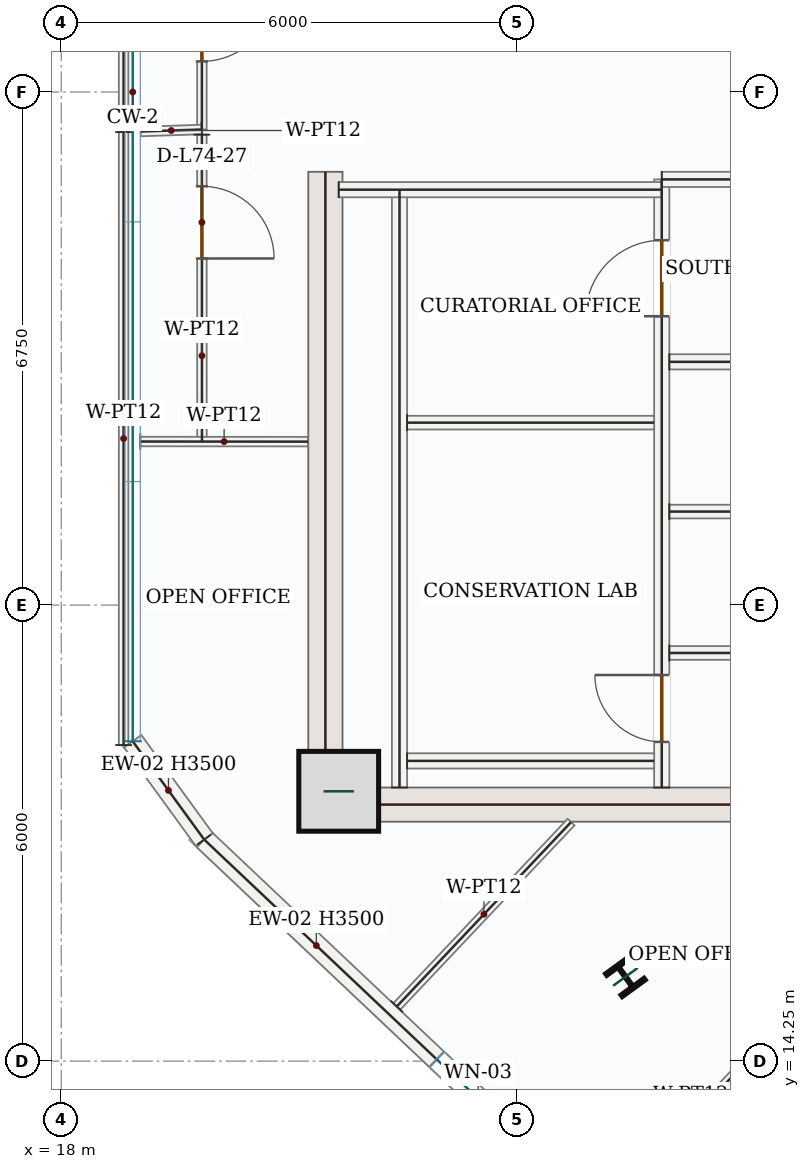
"""IFC4 building model, lengths in metres.
Left out: names, types, materials, properties, quantities, classifications, styles, units other than length and angle.
Written with IfcOpenShell. Run it as: python <this file> out.ifc"""

import sys

from ifc_helpers import new_model, si_unit, direction, frame, frame_2d, origin, origin_2d, place, context, subcontext, project, spatial, rectangle, i_section, extrude, source, transform, mapped, element, fill, save


model = new_model("IFC4")
c1 = context("Model", 3, precision=1e-05, world=origin(), true_north=direction((0.0, 1.0)))
c2 = subcontext(c1, "Body", "Model", "MODEL_VIEW")
j1 = project(units=[si_unit("LENGTHUNIT", "METRE"), si_unit("PLANEANGLEUNIT", "RADIAN")], contexts=[c1])
p1 = place(None, origin())
s1 = spatial("IfcSite", under=j1, at=p1, CompositionType="ELEMENT")
p2 = place(p1, origin())
s2 = spatial("IfcBuilding", under=s1, at=p2, CompositionType="ELEMENT")
p3 = place(p2, frame((0.0, 0.0, 306.6)))
s3 = spatial("IfcBuildingStorey", under=s2, at=p3, CompositionType="ELEMENT", Elevation=306.6)
m1 = source(origin(), c2, "Body", "SweptSolid", [
    extrude(rectangle(XDim=8.55, YDim=0.45, at=frame_2d((4.275, 0.0))), origin(), (0.0, 0.0, 1.0), 3.5),
])
p4 = place(p3, frame((21.475, 17.4, 0.0), z_axis=(0.0, 0.0, 1.0), x_axis=(0.0, 1.0, 0.0)))
e1 = element("IfcWall", 1, at=p4, inside=s3, PredefinedType="SHEAR", context=c2, shape_type="MappedRepresentation", body=[
    mapped(m1, transform((0.0, 0.0, 0.0), x_axis=(1.0, 0.0, 0.0), y_axis=(0.0, 1.0, 0.0), z_axis=(0.0, 0.0, 1.0), scale=1.0)),
])
m2 = source(origin(), c2, "Body", "SweptSolid", [
    extrude(rectangle(XDim=7.1, YDim=0.45, at=frame_2d((3.55, 0.0))), origin(), (0.0, 0.0, 1.0), 3.5),
])
p5 = place(p3, frame((21.7, 17.625, 0.0), z_axis=(0.0, 0.0, 1.0), x_axis=(1.0, 0.0, 0.0)))
e2 = element("IfcWall", 2, at=p5, inside=s3, PredefinedType="SHEAR", context=c2, shape_type="MappedRepresentation", body=[
    mapped(m2, transform((0.0, 0.0, 0.0), x_axis=(1.0, 0.0, 0.0), y_axis=(0.0, 1.0, 0.0), z_axis=(0.0, 0.0, 1.0), scale=1.0)),
])
m3 = source(origin(), c2, "Body", "SweptSolid", [
    extrude(rectangle(XDim=1.05, YDim=1.05, at=origin_2d()), origin(), (0.0, 0.0, 1.0), 3.75),
])
p6 = place(p3, frame((21.65, 17.8, 0.0), z_axis=(0.0, 0.0, 1.0), x_axis=(1.0, 0.0, 0.0)))
e3 = element("IfcColumn", 3, at=p6, inside=s3, PredefinedType="COLUMN", context=c2, shape_type="MappedRepresentation", body=[
    mapped(m3, transform((0.0, 0.0, 0.0), x_axis=(1.0, 0.0, 0.0), y_axis=(0.0, 1.0, 0.0), z_axis=(0.0, 0.0, 1.0), scale=1.0)),
])
m4 = source(origin(), c2, "Body", "SweptSolid", [
    extrude(i_section(OverallWidth=0.374, OverallDepth=0.372, WebThickness=0.016, FlangeThickness=0.026, FilletRadius=0.018, at=origin_2d()), origin(), (0.0, 0.0, 1.0), 3.75),
])
p7 = place(p3, frame((25.422, 15.359, 0.0), z_axis=(0.0, 0.0, 1.0), x_axis=(0.809016994375, 0.587785252292, 0.0)))
e4 = element("IfcColumn", 4, at=p7, inside=s3, PredefinedType="COLUMN", context=c2, shape_type="MappedRepresentation", body=[
    mapped(m4, transform((0.0, 0.0, 0.0), x_axis=(1.0, 0.0, 0.0), y_axis=(0.0, 1.0, 0.0), z_axis=(0.0, 0.0, 1.0), scale=1.0)),
])
p8 = place(p3, frame((27.09, 10.351, 0.0), z_axis=(0.0, 0.0, 1.0), x_axis=(-0.726772856404, 0.686877875022, 0.0)))
e5 = element("IfcWall", 5, at=p8, inside=s3, PredefinedType="SOLIDWALL", context=c2, shape_type="SweptSolid", body=[
    extrude(rectangle(XDim=9.92, YDim=0.28, at=frame_2d((4.96, 0.0))), origin(), (0.0, 0.0, 1.0), 3.5),
])
p9 = place(p8, frame((4.21, 0.0, 0.85)))
e6 = element("IfcOpeningElement", 6, at=p9, cuts=e5, PredefinedType="OPENING", context=c2, shape_type="SweptSolid", body=[
    extrude(rectangle(XDim=1.5, YDim=1.5, at=frame_2d((0.75, 0.75))), frame((0.0, 0.15, 0.0), z_axis=(0.0, -1.0, 0.0), x_axis=(1.0, 0.0, 0.0)), (0.0, 0.0, 1.0), 0.3),
])
m5 = source(origin(), c2, "Body", "SweptSolid", [
    extrude(rectangle(XDim=1.599, YDim=0.28, at=frame_2d((0.799, 0.0))), origin(), (0.0, 0.0, 1.0), 3.5),
])
p10 = place(p3, frame((19.88, 17.165, 0.0), z_axis=(0.0, 0.0, 1.0), x_axis=(-0.58820801539, 0.808709670173, 0.0)))
e7 = element("IfcWall", 7, at=p10, inside=s3, PredefinedType="SOLIDWALL", context=c2, shape_type="MappedRepresentation", body=[
    mapped(m5, transform((0.0, 0.0, 0.0), x_axis=(1.0, 0.0, 0.0), y_axis=(0.0, 1.0, 0.0), z_axis=(0.0, 0.0, 1.0), scale=1.0)),
])
m6 = source(origin(), c2, "Body", "SweptSolid", [
    extrude(rectangle(XDim=7.87, YDim=0.2, at=frame_2d((3.935, 0.0))), origin(), (0.0, 0.0, 1.0), 3.5),
])
p11 = place(p3, frame((22.45, 17.85, 0.0), z_axis=(0.0, 0.0, 1.0), x_axis=(0.0, 1.0, 0.0)))
e8 = element("IfcWall", 8, at=p11, inside=s3, PredefinedType="SOLIDWALL", context=c2, shape_type="MappedRepresentation", body=[
    mapped(m6, transform((0.0, 0.0, 0.0), x_axis=(1.0, 0.0, 0.0), y_axis=(0.0, 1.0, 0.0), z_axis=(0.0, 0.0, 1.0), scale=1.0)),
])
p12 = place(p3, frame((25.9, 17.85, 0.0), z_axis=(0.0, 0.0, 1.0), x_axis=(0.0, 1.0, 0.0)))
e9 = element("IfcWall", 9, at=p12, inside=s3, PredefinedType="SOLIDWALL", context=c2, shape_type="SweptSolid", body=[
    extrude(rectangle(XDim=8.0, YDim=0.2, at=frame_2d((4.0, 0.0))), origin(), (0.0, 0.0, 1.0), 3.5),
])
p13 = place(p12, frame((6.2, 0.0, 0.0)))
e10 = element("IfcOpeningElement", 10, at=p13, cuts=e9, PredefinedType="OPENING", context=c2, shape_type="SweptSolid", body=[
    extrude(rectangle(XDim=1.0, YDim=2.15, at=frame_2d((0.5, 1.075))), frame((0.0, 0.11, 0.0), z_axis=(0.0, -1.0, 0.0), x_axis=(1.0, 0.0, 0.0)), (0.0, 0.0, 1.0), 0.22),
])
p14 = place(p12, frame((0.6, 0.0, 0.0)))
e11 = element("IfcOpeningElement", 11, at=p14, cuts=e9, PredefinedType="OPENING", context=c2, shape_type="SweptSolid", body=[
    extrude(rectangle(XDim=0.88, YDim=2.1, at=frame_2d((0.44, 1.05))), frame((0.0, 0.11, 0.0), z_axis=(0.0, -1.0, 0.0), x_axis=(1.0, 0.0, 0.0)), (0.0, 0.0, 1.0), 0.22),
])
m7 = source(origin(), c2, "Body", "SweptSolid", [
    extrude(rectangle(XDim=4.25, YDim=0.2, at=frame_2d((2.125, 0.0))), origin(), (0.0, 0.0, 1.0), 3.5),
])
p15 = place(p3, frame((21.65, 25.715, 0.0), z_axis=(0.0, 0.0, 1.0), x_axis=(1.0, 0.0, 0.0)))
e12 = element("IfcWall", 12, at=p15, inside=s3, PredefinedType="SOLIDWALL", context=c2, shape_type="MappedRepresentation", body=[
    mapped(m7, transform((0.0, 0.0, 0.0), x_axis=(1.0, 0.0, 0.0), y_axis=(0.0, 1.0, 0.0), z_axis=(0.0, 0.0, 1.0), scale=1.0)),
])
m8 = source(origin(), c2, "Body", "SweptSolid", [
    extrude(rectangle(XDim=3.0, YDim=0.2, at=frame_2d((1.5, 0.0))), origin(), (0.0, 0.0, 1.0), 3.5),
])
p16 = place(p3, frame((25.9, 25.85, 0.0), z_axis=(0.0, 0.0, 1.0), x_axis=(1.0, 0.0, 0.0)))
e13 = element("IfcWall", 13, at=p16, inside=s3, PredefinedType="SOLIDWALL", context=c2, shape_type="MappedRepresentation", body=[
    mapped(m8, transform((0.0, 0.0, 0.0), x_axis=(1.0, 0.0, 0.0), y_axis=(0.0, 1.0, 0.0), z_axis=(0.0, 0.0, 1.0), scale=1.0)),
])
m9 = source(origin(), c2, "Body", "SweptSolid", [
    extrude(rectangle(XDim=3.25, YDim=0.2, at=frame_2d((1.625, 0.0))), origin(), (0.0, 0.0, 1.0), 3.5),
])
p17 = place(p3, frame((22.55, 18.2, 0.0), z_axis=(0.0, 0.0, 1.0), x_axis=(1.0, 0.0, 0.0)))
e14 = element("IfcWall", 14, at=p17, inside=s3, PredefinedType="SOLIDWALL", context=c2, shape_type="MappedRepresentation", body=[
    mapped(m9, transform((0.0, 0.0, 0.0), x_axis=(1.0, 0.0, 0.0), y_axis=(0.0, 1.0, 0.0), z_axis=(0.0, 0.0, 1.0), scale=1.0)),
])
m10 = source(origin(), c2, "Body", "SweptSolid", [
    extrude(rectangle(XDim=3.25, YDim=0.18, at=frame_2d((1.625, 0.0))), origin(), (0.0, 0.0, 1.0), 3.5),
])
p18 = place(p3, frame((22.55, 22.65, 0.0), z_axis=(0.0, 0.0, 1.0), x_axis=(1.0, 0.0, 0.0)))
e15 = element("IfcWall", 15, at=p18, inside=s3, PredefinedType="PARTITIONING", context=c2, shape_type="MappedRepresentation", body=[
    mapped(m10, transform((0.0, 0.0, 0.0), x_axis=(1.0, 0.0, 0.0), y_axis=(0.0, 1.0, 0.0), z_axis=(0.0, 0.0, 1.0), scale=1.0)),
])
m11 = source(origin(), c2, "Body", "SweptSolid", [
    extrude(rectangle(XDim=2.75, YDim=0.2, at=frame_2d((1.375, 0.0))), origin(), (0.0, 0.0, 1.0), 3.5),
])
p19 = place(p3, frame((26.0, 23.45, 0.0), z_axis=(0.0, 0.0, 1.0), x_axis=(1.0, 0.0, 0.0)))
e16 = element("IfcWall", 16, at=p19, inside=s3, PredefinedType="SOLIDWALL", context=c2, shape_type="MappedRepresentation", body=[
    mapped(m11, transform((0.0, 0.0, 0.0), x_axis=(1.0, 0.0, 0.0), y_axis=(0.0, 1.0, 0.0), z_axis=(0.0, 0.0, 1.0), scale=1.0)),
])
p20 = place(p3, frame((26.0, 19.62, 0.0), z_axis=(0.0, 0.0, 1.0), x_axis=(1.0, 0.0, 0.0)))
e17 = element("IfcWall", 17, at=p20, inside=s3, PredefinedType="PARTITIONING", context=c2, shape_type="SweptSolid", body=[
    extrude(rectangle(XDim=2.75, YDim=0.18, at=frame_2d((1.375, 0.0))), origin(), (0.0, 0.0, 1.0), 3.5),
])
p21 = place(p20, frame((0.9, 0.0, 0.0)))
e18 = element("IfcOpeningElement", 18, at=p21, cuts=e17, PredefinedType="OPENING", context=c2, shape_type="SweptSolid", body=[
    extrude(rectangle(XDim=0.88, YDim=2.1, at=frame_2d((0.44, 1.05))), frame((0.0, 0.1, 0.0), z_axis=(0.0, -1.0, 0.0), x_axis=(1.0, 0.0, 0.0)), (0.0, 0.0, 1.0), 0.2),
])
m12 = source(origin(), c2, "Body", "SweptSolid", [
    extrude(rectangle(XDim=2.75, YDim=0.18, at=frame_2d((1.375, 0.0))), origin(), (0.0, 0.0, 1.0), 3.5),
])
p22 = place(p3, frame((26.0, 21.48, 0.0), z_axis=(0.0, 0.0, 1.0), x_axis=(1.0, 0.0, 0.0)))
e19 = element("IfcWall", 19, at=p22, inside=s3, PredefinedType="PARTITIONING", context=c2, shape_type="MappedRepresentation", body=[
    mapped(m12, transform((0.0, 0.0, 0.0), x_axis=(1.0, 0.0, 0.0), y_axis=(0.0, 1.0, 0.0), z_axis=(0.0, 0.0, 1.0), scale=1.0)),
])
p23 = place(p3, frame((19.851, 31.529, 0.0), z_axis=(0.0, 0.0, 1.0), x_axis=(-9.7219521e-05, -0.999999995274, 0.0)))
e20 = element("IfcWall", 20, at=p23, inside=s3, PredefinedType="PARTITIONING", context=c2, shape_type="SweptSolid", body=[
    extrude(rectangle(XDim=5.022, YDim=0.125, at=frame_2d((2.511, 0.0))), origin(), (0.0, 0.0, 1.0), 3.5),
])
p24 = place(p23, frame((3.177, 0.0, 0.0)))
e21 = element("IfcOpeningElement", 21, at=p24, cuts=e20, PredefinedType="OPENING", context=c2, shape_type="SweptSolid", body=[
    extrude(rectangle(XDim=0.95, YDim=2.15, at=frame_2d((0.475, 1.075))), frame((0.0, 0.073, 0.0), z_axis=(0.0, -1.0, 0.0), x_axis=(1.0, 0.0, 0.0)), (0.0, 0.0, 1.0), 0.145),
])
m13 = source(origin(), c2, "Body", "SweptSolid", [
    extrude(rectangle(XDim=0.804, YDim=0.125, at=frame_2d((0.402, 0.0))), origin(), (0.0, 0.0, 1.0), 3.5),
])
p25 = place(p3, frame((19.849, 26.507, 0.0), z_axis=(0.0, 0.0, 1.0), x_axis=(-0.999452627665, -0.03308239794, 0.0)))
e22 = element("IfcWall", 22, at=p25, inside=s3, PredefinedType="PARTITIONING", context=c2, shape_type="MappedRepresentation", body=[
    mapped(m13, transform((0.0, 0.0, 0.0), x_axis=(1.0, 0.0, 0.0), y_axis=(0.0, 1.0, 0.0), z_axis=(0.0, 0.0, 1.0), scale=1.0)),
])
m14 = source(origin(), c2, "Body", "SweptSolid", [
    extrude(rectangle(XDim=9.119, YDim=0.125, at=frame_2d((4.56, 0.0))), origin(), (0.0, 0.0, 1.0), 3.5),
])
p26 = place(p3, frame((18.82, 26.473, 0.0), z_axis=(0.0, 0.0, 1.0), x_axis=(0.0, 1.0, 0.0)))
e23 = element("IfcWall", 23, at=p26, inside=s3, PredefinedType="PARTITIONING", context=c2, shape_type="MappedRepresentation", body=[
    mapped(m14, transform((0.0, 0.0, 0.0), x_axis=(1.0, 0.0, 0.0), y_axis=(0.0, 1.0, 0.0), z_axis=(0.0, 0.0, 1.0), scale=1.0)),
])
m15 = source(origin(), c2, "Body", "SweptSolid", [
    extrude(rectangle(XDim=3.337, YDim=0.125, at=frame_2d((1.669, 0.0))), origin(), (0.0, 0.0, 1.0), 3.5),
])
p27 = place(p3, frame((22.415, 14.969, 0.0), z_axis=(0.0, 0.0, 1.0), x_axis=(0.686891986515, 0.726759519278, 0.0)))
e24 = element("IfcWall", 24, at=p27, inside=s3, PredefinedType="PARTITIONING", context=c2, shape_type="MappedRepresentation", body=[
    mapped(m15, transform((0.0, 0.0, 0.0), x_axis=(1.0, 0.0, 0.0), y_axis=(0.0, 1.0, 0.0), z_axis=(0.0, 0.0, 1.0), scale=1.0)),
])
p28 = place(p3, frame((29.328, 16.694, 0.0), z_axis=(0.0, 0.0, 1.0), x_axis=(-0.686871949206, -0.726778456886, 0.0)))
e25 = element("IfcWall", 25, at=p28, inside=s3, PredefinedType="PARTITIONING", context=c2, shape_type="SweptSolid", body=[
    extrude(rectangle(XDim=6.001, YDim=0.125, at=frame_2d((3.001, 0.0))), origin(), (0.0, 0.0, 1.0), 3.5),
])
p29 = place(p28, frame((1.768, 0.0, 0.0)))
e26 = element("IfcOpeningElement", 26, at=p29, cuts=e25, PredefinedType="OPENING", context=c2, shape_type="SweptSolid", body=[
    extrude(rectangle(XDim=0.95, YDim=2.15, at=frame_2d((0.475, 1.075))), frame((0.0, 0.073, 0.0), z_axis=(0.0, -1.0, 0.0), x_axis=(1.0, 0.0, 0.0)), (0.0, 0.0, 1.0), 0.145),
])
p30 = place(p3, frame((19.85, 26.439, 0.0), z_axis=(0.0, 0.0, 1.0), x_axis=(0.000241837961, -0.999999970757, 0.0)))
e27 = element("IfcWall", 27, at=p30, inside=s3, PredefinedType="PARTITIONING", context=c2, shape_type="SweptSolid", body=[
    extrude(rectangle(XDim=4.038, YDim=0.125, at=frame_2d((2.019, 0.0))), origin(), (0.0, 0.0, 1.0), 3.5),
])
p31 = place(p30, frame((0.679, 0.0, 0.0)))
e28 = element("IfcOpeningElement", 28, at=p31, cuts=e27, PredefinedType="OPENING", context=c2, shape_type="SweptSolid", body=[
    extrude(rectangle(XDim=0.95, YDim=2.15, at=frame_2d((0.475, 1.075))), frame((0.0, 0.073, 0.0), z_axis=(0.0, -1.0, 0.0), x_axis=(1.0, 0.0, 0.0)), (0.0, 0.0, 1.0), 0.145),
])
m16 = source(origin(), c2, "Body", "SweptSolid", [
    extrude(rectangle(XDim=2.205, YDim=0.125, at=frame_2d((1.103, 0.0))), origin(), (0.0, 0.0, 1.0), 3.5),
])
p32 = place(p3, frame((19.04, 22.402, 0.0), z_axis=(0.0, 0.0, 1.0), x_axis=(0.99999969967, -0.000775021911, 0.0)))
e29 = element("IfcWall", 29, at=p32, inside=s3, PredefinedType="PARTITIONING", context=c2, shape_type="MappedRepresentation", body=[
    mapped(m16, transform((0.0, 0.0, 0.0), x_axis=(1.0, 0.0, 0.0), y_axis=(0.0, 1.0, 0.0), z_axis=(0.0, 0.0, 1.0), scale=1.0)),
])
m17 = source(origin(), c2, "Body", "SweptSolid", [
    extrude(rectangle(XDim=8.064, YDim=0.125, at=frame_2d((4.032, 0.0))), origin(), (0.0, 0.0, 1.0), 3.5),
])
p33 = place(p3, frame((18.82, 18.408, 0.0), z_axis=(0.0, 0.0, 1.0), x_axis=(0.0, 1.0, 0.0)))
e30 = element("IfcWall", 30, at=p33, inside=s3, PredefinedType="PARTITIONING", context=c2, shape_type="MappedRepresentation", body=[
    mapped(m17, transform((0.0, 0.0, 0.0), x_axis=(1.0, 0.0, 0.0), y_axis=(0.0, 1.0, 0.0), z_axis=(0.0, 0.0, 1.0), scale=1.0)),
])
m18 = source(origin(), c2, "Body", "SweptSolid", [
    extrude(rectangle(XDim=1.5, YDim=1.5, at=frame_2d((0.75, 0.75))), frame((0.0, 0.03, 0.0), z_axis=(0.0, -1.0, 0.0), x_axis=(1.0, 0.0, 0.0)), (0.0, 0.0, 1.0), 0.06),
])
p34 = place(p9, origin())
e31 = element("IfcWindow", 31, at=p34, inside=s3, PartitioningType="SINGLE_PANEL", PredefinedType="WINDOW", context=c2, shape_type="MappedRepresentation", body=[
    mapped(m18, transform((0.0, 0.0, 0.0), x_axis=(1.0, 0.0, 0.0), y_axis=(0.0, 1.0, 0.0), z_axis=(0.0, 0.0, 1.0), scale=1.0)),
])
fill(e6, e31)
m19 = source(origin(), c2, "Body", "SweptSolid", [
    extrude(rectangle(XDim=1.0, YDim=2.15, at=frame_2d((0.5, 1.075))), frame((0.0, 0.025, 0.0), z_axis=(0.0, -1.0, 0.0), x_axis=(1.0, 0.0, 0.0)), (0.0, 0.0, 1.0), 0.05),
])
p35 = place(p13, origin())
e32 = element("IfcDoor", 32, at=p35, inside=s3, OperationType="SINGLE_SWING_LEFT", PredefinedType="DOOR", context=c2, shape_type="MappedRepresentation", body=[
    mapped(m19, transform((0.0, 0.0, 0.0), x_axis=(1.0, 0.0, 0.0), y_axis=(0.0, 1.0, 0.0), z_axis=(0.0, 0.0, 1.0), scale=1.0)),
])
fill(e10, e32)
m20 = source(origin(), c2, "Body", "SweptSolid", [
    extrude(rectangle(XDim=0.88, YDim=2.1, at=frame_2d((0.44, 1.05))), frame((0.0, 0.025, 0.0), z_axis=(0.0, -1.0, 0.0), x_axis=(1.0, 0.0, 0.0)), (0.0, 0.0, 1.0), 0.05),
])
p36 = place(p14, origin())
e33 = element("IfcDoor", 33, at=p36, inside=s3, OperationType="SINGLE_SWING_RIGHT", PredefinedType="DOOR", context=c2, shape_type="MappedRepresentation", body=[
    mapped(m20, transform((0.0, 0.0, 0.0), x_axis=(1.0, 0.0, 0.0), y_axis=(0.0, 1.0, 0.0), z_axis=(0.0, 0.0, 1.0), scale=1.0)),
])
fill(e11, e33)
m21 = source(origin(), c2, "Body", "SweptSolid", [
    extrude(rectangle(XDim=0.95, YDim=2.15, at=frame_2d((0.475, 1.075))), frame((0.0, 0.025, 0.0), z_axis=(0.0, -1.0, 0.0), x_axis=(1.0, 0.0, 0.0)), (0.0, 0.0, 1.0), 0.05),
])
p37 = place(p24, origin())
e34 = element("IfcDoor", 34, at=p37, inside=s3, OperationType="SINGLE_SWING_LEFT", PredefinedType="DOOR", context=c2, shape_type="MappedRepresentation", body=[
    mapped(m21, transform((0.0, 0.0, 0.0), x_axis=(1.0, 0.0, 0.0), y_axis=(0.0, 1.0, 0.0), z_axis=(0.0, 0.0, 1.0), scale=1.0)),
])
fill(e21, e34)
p38 = place(p31, origin())
e35 = element("IfcDoor", 35, at=p38, inside=s3, OperationType="SINGLE_SWING_RIGHT", PredefinedType="DOOR", context=c2, shape_type="MappedRepresentation", body=[
    mapped(m21, transform((0.0, 0.0, 0.0), x_axis=(1.0, 0.0, 0.0), y_axis=(0.0, 1.0, 0.0), z_axis=(0.0, 0.0, 1.0), scale=1.0)),
])
fill(e28, e35)
save(model, sys.argv[1])
